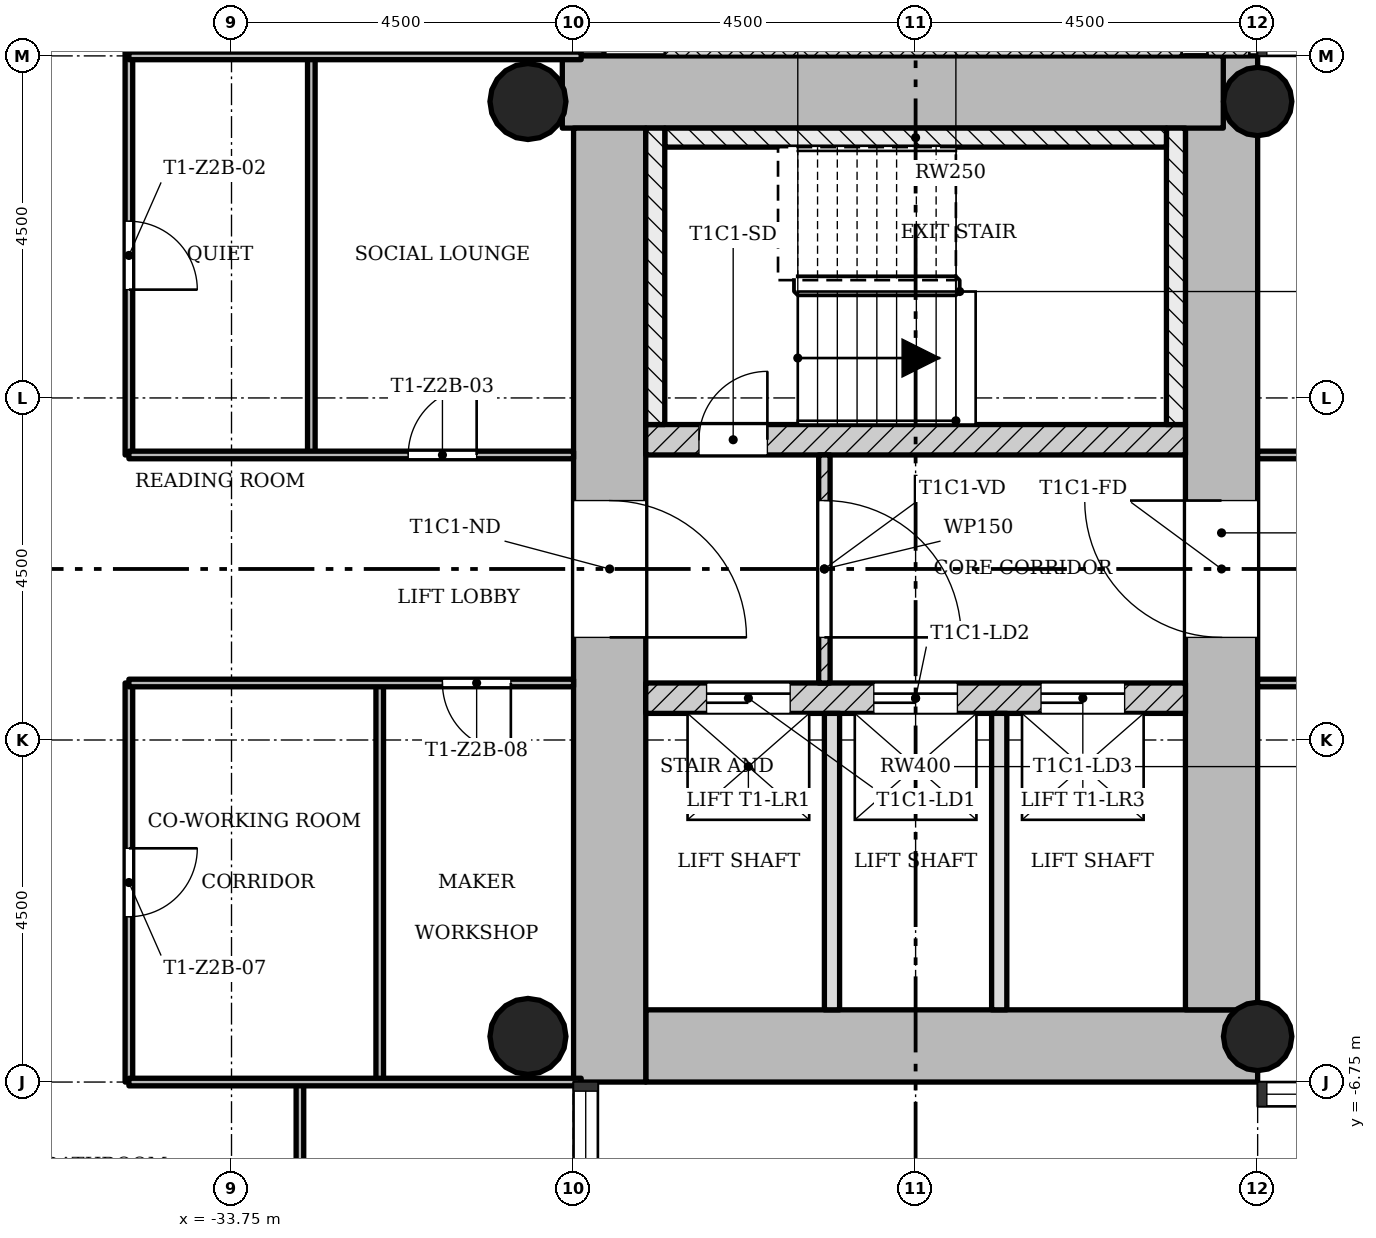
"""IFC4 building model, lengths in metres.
Left out: names, types, materials, properties, quantities, classifications, styles, units other than length and angle.
Written with IfcOpenShell. Run it as: python <this file> out.ifc"""

import sys

from ifc_helpers import new_model, si_unit, direction, frame, frame_2d, origin, origin_2d, place, context, subcontext, project, spatial, rectangle, hollow_circle, extrude, element, fill, save


model = new_model("IFC4")
c1 = context("Model", 3, precision=1e-05, world=origin(), true_north=direction((0.0, 1.0)))
c2 = subcontext(c1, "Body", "Model", "MODEL_VIEW")
j1 = project(units=[si_unit("LENGTHUNIT", "METRE"), si_unit("PLANEANGLEUNIT", "RADIAN")], contexts=[c1])
p1 = place(None, origin())
s1 = spatial("IfcSite", under=j1, at=p1, CompositionType="ELEMENT")
p2 = place(p1, origin())
s2 = spatial("IfcBuilding", under=s1, at=p2, CompositionType="ELEMENT")
p3 = place(p2, frame((0.0, 0.0, 83.4)))
s3 = spatial("IfcBuildingStorey", under=s2, at=p3, CompositionType="ELEMENT", Elevation=83.4)
p4 = place(p3, frame((-28.3, -6.275, 0.0), z_axis=(0.0, 0.0, 1.0), x_axis=(1.0, 0.0, 0.0)))
e1 = element("IfcWall", 1, at=p4, inside=s3, PredefinedType="SHEAR", context=c2, shape_type="SweptSolid", body=[
    extrude(rectangle(XDim=8.05, YDim=0.95, at=frame_2d((4.025, 0.0))), origin(), (0.0, 0.0, 1.0), 3.4),
])
p5 = place(p3, frame((-20.725, -5.8, 0.0), z_axis=(0.0, 0.0, 1.0), x_axis=(0.0, 1.0, 0.0)))
e2 = element("IfcWall", 2, at=p5, inside=s3, PredefinedType="SHEAR", context=c2, shape_type="SweptSolid", body=[
    extrude(rectangle(XDim=12.55, YDim=0.95, at=frame_2d((6.275, 0.0))), origin(), (0.0, 0.0, 1.0), 3.4),
])
p6 = place(p5, frame((4.9, 0.0, 0.0)))
e3 = element("IfcOpeningElement", 3, at=p6, cuts=e2, PredefinedType="OPENING", context=c2, shape_type="SweptSolid", body=[
    extrude(rectangle(XDim=1.8, YDim=2.1, at=frame_2d((0.9, 1.05))), frame((0.0, 0.485, 0.0), z_axis=(0.0, -1.0, 0.0), x_axis=(1.0, 0.0, 0.0)), (0.0, 0.0, 1.0), 0.97),
])
p7 = place(p3, frame((-20.702, 6.275, 0.0), z_axis=(0.0, 0.0, 1.0), x_axis=(-1.0, 0.0, 0.0)))
e4 = element("IfcWall", 4, at=p7, inside=s3, PredefinedType="SHEAR", context=c2, shape_type="SweptSolid", body=[
    extrude(rectangle(XDim=8.696, YDim=0.95, at=frame_2d((4.348, 0.0))), origin(), (0.0, 0.0, 1.0), 3.4),
])
p8 = place(p3, frame((-28.775, 5.8, 0.0), z_axis=(0.0, 0.0, 1.0), x_axis=(0.0, -1.0, 0.0)))
e5 = element("IfcWall", 5, at=p8, inside=s3, PredefinedType="SHEAR", context=c2, shape_type="SweptSolid", body=[
    extrude(rectangle(XDim=12.55, YDim=0.95, at=frame_2d((6.275, 0.0))), origin(), (0.0, 0.0, 1.0), 3.4),
])
p9 = place(p8, frame((4.9, 0.0, 0.0)))
e6 = element("IfcOpeningElement", 6, at=p9, cuts=e5, PredefinedType="OPENING", context=c2, shape_type="SweptSolid", body=[
    extrude(rectangle(XDim=1.8, YDim=2.1, at=frame_2d((0.9, 1.05))), frame((0.0, 0.485, 0.0), z_axis=(0.0, -1.0, 0.0), x_axis=(1.0, 0.0, 0.0)), (0.0, 0.0, 1.0), 0.97),
])
p10 = place(p3, frame((-28.3, -1.7, 0.0), z_axis=(0.0, 0.0, 1.0), x_axis=(1.0, 0.0, 0.0)))
e7 = element("IfcWall", 7, at=p10, inside=s3, PredefinedType="SHEAR", context=c2, shape_type="SweptSolid", body=[
    extrude(rectangle(XDim=7.1, YDim=0.4, at=frame_2d((3.55, 0.0))), origin(), (0.0, 0.0, 1.0), 3.4),
])
p11 = place(p10, frame((0.8, 0.0, 0.0)))
e8 = element("IfcOpeningElement", 8, at=p11, cuts=e7, PredefinedType="OPENING", context=c2, shape_type="SweptSolid", body=[
    extrude(rectangle(XDim=1.1, YDim=2.1, at=frame_2d((0.55, 1.05))), frame((0.0, 0.21, 0.0), z_axis=(0.0, -1.0, 0.0), x_axis=(1.0, 0.0, 0.0)), (0.0, 0.0, 1.0), 0.42),
])
p12 = place(p10, frame((3.0, 0.0, 0.0)))
e9 = element("IfcOpeningElement", 9, at=p12, cuts=e7, PredefinedType="OPENING", context=c2, shape_type="SweptSolid", body=[
    extrude(rectangle(XDim=1.1, YDim=2.1, at=frame_2d((0.55, 1.05))), frame((0.0, 0.21, 0.0), z_axis=(0.0, -1.0, 0.0), x_axis=(1.0, 0.0, 0.0)), (0.0, 0.0, 1.0), 0.42),
])
p13 = place(p10, frame((5.2, 0.0, 0.0)))
e10 = element("IfcOpeningElement", 10, at=p13, cuts=e7, PredefinedType="OPENING", context=c2, shape_type="SweptSolid", body=[
    extrude(rectangle(XDim=1.1, YDim=2.1, at=frame_2d((0.55, 1.05))), frame((0.0, 0.21, 0.0), z_axis=(0.0, -1.0, 0.0), x_axis=(1.0, 0.0, 0.0)), (0.0, 0.0, 1.0), 0.42),
])
p14 = place(p3, frame((-28.3, 1.7, 0.0), z_axis=(0.0, 0.0, 1.0), x_axis=(1.0, 0.0, 0.0)))
e11 = element("IfcWall", 11, at=p14, inside=s3, PredefinedType="SHEAR", context=c2, shape_type="SweptSolid", body=[
    extrude(rectangle(XDim=7.1, YDim=0.4, at=frame_2d((3.55, 0.0))), origin(), (0.0, 0.0, 1.0), 3.4),
])
p15 = place(p14, frame((0.7, 0.0, 0.0)))
e12 = element("IfcOpeningElement", 12, at=p15, cuts=e11, PredefinedType="OPENING", context=c2, shape_type="SweptSolid", body=[
    extrude(rectangle(XDim=0.9, YDim=2.1, at=frame_2d((0.45, 1.05))), frame((0.0, 0.21, 0.0), z_axis=(0.0, -1.0, 0.0), x_axis=(1.0, 0.0, 0.0)), (0.0, 0.0, 1.0), 0.42),
])
for number, where, z_axis, x_axis in (
    (13, (-20.25, -6.15, 0.0), (0.0, 0.0, 1.0), (1.0, 0.0, 0.0)),
    (14, (-20.25, 6.15, 0.0), (0.0, 0.0, 1.0), (1.0, 0.0, 0.0)),
):
    element("IfcColumn", number, at=place(p3, frame(where, z_axis=z_axis, x_axis=x_axis)), inside=s3, PredefinedType="COLUMN", context=c2, shape_type="SweptSolid", body=[
        extrude(hollow_circle(Radius=0.45, WallThickness=0.032, at=origin_2d()), origin(), (0.0, 0.0, 1.0), 3.4),
    ])
for number, where, z_axis, x_axis in (
    (15, (-29.85, -6.15, 0.0), (0.0, 0.0, 1.0), (1.0, 0.0, 0.0)),
    (16, (-29.85, 6.15, 0.0), (0.0, 0.0, 1.0), (1.0, 0.0, 0.0)),
):
    element("IfcColumn", number, at=place(p3, frame(where, z_axis=z_axis, x_axis=x_axis)), inside=s3, PredefinedType="COLUMN", context=c2, shape_type="SweptSolid", body=[
        extrude(hollow_circle(Radius=0.5, WallThickness=0.036, at=origin_2d()), origin(), (0.0, 0.0, 1.0), 3.4),
    ])
p16 = place(p3, frame((-29.05, 6.75, -0.02), z_axis=(0.0, 0.0, 1.0), x_axis=(0.0, 1.0, 0.0)))
e17 = element("IfcWall", 17, at=p16, inside=s3, PredefinedType="STANDARD", context=c2, shape_type="SweptSolid", body=[
    extrude(rectangle(XDim=4.5, YDim=0.4, at=frame_2d((2.25, 0.0))), origin(), (0.0, 0.0, 1.0), 3.12),
])
p17 = place(p16, frame((1.35, 0.0, 0.02)))
e18 = element("IfcOpeningElement", 18, at=p17, cuts=e17, PredefinedType="OPENING", context=c2, shape_type="SweptSolid", body=[
    extrude(rectangle(XDim=1.8, YDim=2.1, at=frame_2d((0.9, 1.05))), frame((0.0, 0.21, 0.0), z_axis=(0.0, -1.0, 0.0), x_axis=(1.0, 0.0, 0.0)), (0.0, 0.0, 1.0), 0.42),
])
p18 = place(p3, frame((-25.95, -1.5, 0.0), z_axis=(0.0, 0.0, 1.0), x_axis=(0.0, 1.0, 0.0)))
e19 = element("IfcWall", 19, at=p18, inside=s3, PredefinedType="PARTITIONING", context=c2, shape_type="SweptSolid", body=[
    extrude(rectangle(XDim=3.0, YDim=0.15, at=frame_2d((1.5, 0.0))), origin(), (0.0, 0.0, 1.0), 3.0),
])
p19 = place(p18, frame((0.6, 0.0, 0.0)))
e20 = element("IfcOpeningElement", 20, at=p19, cuts=e19, PredefinedType="OPENING", context=c2, shape_type="SweptSolid", body=[
    extrude(rectangle(XDim=1.8, YDim=2.1, at=frame_2d((0.9, 1.05))), frame((0.0, 0.085, 0.0), z_axis=(0.0, -1.0, 0.0), x_axis=(1.0, 0.0, 0.0)), (0.0, 0.0, 1.0), 0.17),
])
for number, where, z_axis, x_axis in (
    (21, (-25.85, -5.8, 0.0), (0.0, 0.0, 1.0), (0.0, 1.0, 0.0)),
    (22, (-23.65, -5.8, 0.0), (0.0, 0.0, 1.0), (0.0, 1.0, 0.0)),
):
    element("IfcWall", number, at=place(p3, frame(where, z_axis=z_axis, x_axis=x_axis)), inside=s3, PredefinedType="SOLIDWALL", context=c2, shape_type="SweptSolid", body=[
        extrude(rectangle(XDim=3.9, YDim=0.2, at=frame_2d((1.95, 0.0))), origin(), (0.0, 0.0, 1.0), 3.0),
    ])
p20 = place(p3, frame((-35.1, -6.75, 0.0), z_axis=(0.0, 0.0, 1.0), x_axis=(0.0, 1.0, 0.0)))
e23 = element("IfcWall", 23, at=p20, inside=s3, PredefinedType="PARTITIONING", context=c2, shape_type="SweptSolid", body=[
    extrude(rectangle(XDim=5.25, YDim=0.1, at=frame_2d((2.625, 0.0))), origin(), (0.0, 0.0, 1.0), 3.0),
])
p21 = place(p20, frame((2.175, 0.0, 0.0)))
e24 = element("IfcOpeningElement", 24, at=p21, cuts=e23, PredefinedType="OPENING", context=c2, shape_type="SweptSolid", body=[
    extrude(rectangle(XDim=0.9, YDim=2.1, at=frame_2d((0.45, 1.05))), frame((0.0, 0.06, 0.0), z_axis=(0.0, -1.0, 0.0), x_axis=(1.0, 0.0, 0.0)), (0.0, 0.0, 1.0), 0.12),
])
p22 = place(p3, frame((-35.1, 1.5, 0.0), z_axis=(0.0, 0.0, 1.0), x_axis=(0.0, 1.0, 0.0)))
e25 = element("IfcWall", 25, at=p22, inside=s3, PredefinedType="PARTITIONING", context=c2, shape_type="SweptSolid", body=[
    extrude(rectangle(XDim=9.75, YDim=0.1, at=frame_2d((4.875, 0.0))), origin(), (0.0, 0.0, 1.0), 3.0),
])
p23 = place(p22, frame((2.175, 0.0, 0.0)))
e26 = element("IfcOpeningElement", 26, at=p23, cuts=e25, PredefinedType="OPENING", context=c2, shape_type="SweptSolid", body=[
    extrude(rectangle(XDim=0.9, YDim=2.1, at=frame_2d((0.45, 1.05))), frame((0.0, 0.06, 0.0), z_axis=(0.0, -1.0, 0.0), x_axis=(1.0, 0.0, 0.0)), (0.0, 0.0, 1.0), 0.12),
])
p24 = place(p22, frame((7.05, 0.0, 0.0)))
e27 = element("IfcOpeningElement", 27, at=p24, cuts=e25, PredefinedType="OPENING", context=c2, shape_type="SweptSolid", body=[
    extrude(rectangle(XDim=0.9, YDim=2.1, at=frame_2d((0.45, 1.05))), frame((0.0, 0.06, 0.0), z_axis=(0.0, -1.0, 0.0), x_axis=(1.0, 0.0, 0.0)), (0.0, 0.0, 1.0), 0.12),
])
p25 = place(p3, frame((-32.85, -15.75, 0.0), z_axis=(0.0, 0.0, 1.0), x_axis=(0.0, 1.0, 0.0)))
e28 = element("IfcWall", 28, at=p25, inside=s3, PredefinedType="PARTITIONING", context=c2, shape_type="SweptSolid", body=[
    extrude(rectangle(XDim=9.0, YDim=0.1, at=frame_2d((4.5, 0.0))), origin(), (0.0, 0.0, 1.0), 3.0),
])
p26 = place(p25, frame((5.55, 0.0, 0.0)))
e29 = element("IfcOpeningElement", 29, at=p26, cuts=e28, PredefinedType="OPENING", context=c2, shape_type="SweptSolid", body=[
    extrude(rectangle(XDim=0.9, YDim=2.1, at=frame_2d((0.45, 1.05))), frame((0.0, 0.06, 0.0), z_axis=(0.0, -1.0, 0.0), x_axis=(1.0, 0.0, 0.0)), (0.0, 0.0, 1.0), 0.12),
])
for number, where, z_axis, x_axis in (
    (30, (-32.7, 1.5, 0.0), (0.0, 0.0, 1.0), (0.0, 1.0, 0.0)),
    (31, (-31.8, -6.75, 0.0), (0.0, 0.0, 1.0), (0.0, 1.0, 0.0)),
):
    element("IfcWall", number, at=place(p3, frame(where, z_axis=z_axis, x_axis=x_axis)), inside=s3, PredefinedType="PARTITIONING", context=c2, shape_type="SweptSolid", body=[
        extrude(rectangle(XDim=5.25, YDim=0.1, at=frame_2d((2.625, 0.0))), origin(), (0.0, 0.0, 1.0), 3.0),
    ])
p27 = place(p3, frame((-35.1, -6.75, 0.0), z_axis=(0.0, 0.0, 1.0), x_axis=(1.0, 0.0, 0.0)))
e32 = element("IfcWall", 32, at=p27, inside=s3, PredefinedType="PARTITIONING", context=c2, shape_type="SweptSolid", body=[
    extrude(rectangle(XDim=5.95, YDim=0.1, at=frame_2d((2.975, 0.0))), origin(), (0.0, 0.0, 1.0), 3.0),
])
p28 = place(p3, frame((-35.1, -1.5, 0.0), z_axis=(0.0, 0.0, 1.0), x_axis=(1.0, 0.0, 0.0)))
e33 = element("IfcWall", 33, at=p28, inside=s3, PredefinedType="PARTITIONING", context=c2, shape_type="SweptSolid", body=[
    extrude(rectangle(XDim=5.85, YDim=0.1, at=frame_2d((2.925, 0.0))), origin(), (0.0, 0.0, 1.0), 3.0),
])
p29 = place(p28, frame((4.125, 0.0, 0.0)))
e34 = element("IfcOpeningElement", 34, at=p29, cuts=e33, PredefinedType="OPENING", context=c2, shape_type="SweptSolid", body=[
    extrude(rectangle(XDim=0.9, YDim=2.1, at=frame_2d((0.45, 1.05))), frame((0.0, 0.06, 0.0), z_axis=(0.0, -1.0, 0.0), x_axis=(1.0, 0.0, 0.0)), (0.0, 0.0, 1.0), 0.12),
])
p30 = place(p3, frame((-20.25, -1.5, 0.0), z_axis=(0.0, 0.0, 1.0), x_axis=(1.0, 0.0, 0.0)))
e35 = element("IfcWall", 35, at=p30, inside=s3, PredefinedType="PARTITIONING", context=c2, shape_type="SweptSolid", body=[
    extrude(rectangle(XDim=4.5, YDim=0.1, at=frame_2d((2.25, 0.0))), origin(), (0.0, 0.0, 1.0), 3.0),
])
p31 = place(p30, frame((1.8, 0.0, 0.0)))
e36 = element("IfcOpeningElement", 36, at=p31, cuts=e35, PredefinedType="OPENING", context=c2, shape_type="SweptSolid", body=[
    extrude(rectangle(XDim=0.9, YDim=2.1, at=frame_2d((0.45, 1.05))), frame((0.0, 0.06, 0.0), z_axis=(0.0, -1.0, 0.0), x_axis=(1.0, 0.0, 0.0)), (0.0, 0.0, 1.0), 0.12),
])
p32 = place(p3, frame((-35.1, 1.5, 0.0), z_axis=(0.0, 0.0, 1.0), x_axis=(1.0, 0.0, 0.0)))
e37 = element("IfcWall", 37, at=p32, inside=s3, PredefinedType="PARTITIONING", context=c2, shape_type="SweptSolid", body=[
    extrude(rectangle(XDim=5.85, YDim=0.1, at=frame_2d((2.925, 0.0))), origin(), (0.0, 0.0, 1.0), 3.0),
])
p33 = place(p32, frame((3.675, 0.0, 0.0)))
e38 = element("IfcOpeningElement", 38, at=p33, cuts=e37, PredefinedType="OPENING", context=c2, shape_type="SweptSolid", body=[
    extrude(rectangle(XDim=0.9, YDim=2.1, at=frame_2d((0.45, 1.05))), frame((0.0, 0.06, 0.0), z_axis=(0.0, -1.0, 0.0), x_axis=(1.0, 0.0, 0.0)), (0.0, 0.0, 1.0), 0.12),
])
p34 = place(p3, frame((-20.25, 1.5, 0.0), z_axis=(0.0, 0.0, 1.0), x_axis=(1.0, 0.0, 0.0)))
e39 = element("IfcWall", 39, at=p34, inside=s3, PredefinedType="PARTITIONING", context=c2, shape_type="SweptSolid", body=[
    extrude(rectangle(XDim=4.5, YDim=0.1, at=frame_2d((2.25, 0.0))), origin(), (0.0, 0.0, 1.0), 3.0),
])
p35 = place(p34, frame((1.8, 0.0, 0.0)))
e40 = element("IfcOpeningElement", 40, at=p35, cuts=e39, PredefinedType="OPENING", context=c2, shape_type="SweptSolid", body=[
    extrude(rectangle(XDim=0.9, YDim=2.1, at=frame_2d((0.45, 1.05))), frame((0.0, 0.06, 0.0), z_axis=(0.0, -1.0, 0.0), x_axis=(1.0, 0.0, 0.0)), (0.0, 0.0, 1.0), 0.12),
])
p36 = place(p3, frame((-35.1, 6.75, 0.0), z_axis=(0.0, 0.0, 1.0), x_axis=(1.0, 0.0, 0.0)))
e41 = element("IfcWall", 41, at=p36, inside=s3, PredefinedType="PARTITIONING", context=c2, shape_type="SweptSolid", body=[
    extrude(rectangle(XDim=5.95, YDim=0.1, at=frame_2d((2.975, 0.0))), origin(), (0.0, 0.0, 1.0), 3.0),
])
p37 = place(p3, frame((-21.325, 1.9, 0.0), z_axis=(0.0, 0.0, 1.0), x_axis=(0.0, 1.0, 0.0)))
e42 = element("IfcWall", 42, at=p37, inside=s3, PredefinedType="SHEAR", context=c2, shape_type="SweptSolid", body=[
    extrude(rectangle(XDim=3.9, YDim=0.25, at=frame_2d((1.95, 0.0))), origin(), (0.0, 0.0, 1.0), 3.4),
])
p38 = place(p3, frame((-28.05, 5.675, 0.0), z_axis=(0.0, 0.0, 1.0), x_axis=(1.0, 0.0, 0.0)))
e43 = element("IfcWall", 43, at=p38, inside=s3, PredefinedType="SHEAR", context=c2, shape_type="SweptSolid", body=[
    extrude(rectangle(XDim=6.6, YDim=0.25, at=frame_2d((3.3, 0.0))), origin(), (0.0, 0.0, 1.0), 3.4),
])
p39 = place(p3, frame((-28.175, 1.9, 0.0), z_axis=(0.0, 0.0, 1.0), x_axis=(0.0, 1.0, 0.0)))
e44 = element("IfcWall", 44, at=p39, inside=s3, PredefinedType="SHEAR", context=c2, shape_type="SweptSolid", body=[
    extrude(rectangle(XDim=3.9, YDim=0.25, at=frame_2d((1.95, 0.0))), origin(), (0.0, 0.0, 1.0), 3.4),
])
p40 = place(p19, origin())
e45 = element("IfcDoor", 45, at=p40, inside=s3, OperationType="SINGLE_SWING_LEFT", PredefinedType="DOOR", context=c2, shape_type="SweptSolid", body=[
    extrude(rectangle(XDim=1.8, YDim=2.1, at=frame_2d((0.9, 1.05))), frame((0.0, 0.025, 0.0), z_axis=(0.0, -1.0, 0.0), x_axis=(1.0, 0.0, 0.0)), (0.0, 0.0, 1.0), 0.05),
])
fill(e20, e45)
p41 = place(p23, origin())
e46 = element("IfcDoor", 46, at=p41, inside=s3, OperationType="SINGLE_SWING_LEFT", PredefinedType="DOOR", context=c2, shape_type="SweptSolid", body=[
    extrude(rectangle(XDim=0.9, YDim=2.1, at=frame_2d((0.45, 1.05))), frame((0.0, 0.025, 0.0), z_axis=(0.0, -1.0, 0.0), x_axis=(1.0, 0.0, 0.0)), (0.0, 0.0, 1.0), 0.05),
])
fill(e26, e46)
p42 = place(p33, origin())
e47 = element("IfcDoor", 47, at=p42, inside=s3, OperationType="SINGLE_SWING_LEFT", PredefinedType="DOOR", context=c2, shape_type="SweptSolid", body=[
    extrude(rectangle(XDim=0.9, YDim=2.1, at=frame_2d((0.45, 1.05))), frame((0.0, 0.025, 0.0), z_axis=(0.0, -1.0, 0.0), x_axis=(1.0, 0.0, 0.0)), (0.0, 0.0, 1.0), 0.05),
])
fill(e38, e47)
p43 = place(p21, origin())
e48 = element("IfcDoor", 48, at=p43, inside=s3, OperationType="SINGLE_SWING_RIGHT", PredefinedType="DOOR", context=c2, shape_type="SweptSolid", body=[
    extrude(rectangle(XDim=0.9, YDim=2.1, at=frame_2d((0.45, 1.05))), frame((0.0, 0.025, 0.0), z_axis=(0.0, -1.0, 0.0), x_axis=(1.0, 0.0, 0.0)), (0.0, 0.0, 1.0), 0.05),
])
fill(e24, e48)
p44 = place(p29, origin())
e49 = element("IfcDoor", 49, at=p44, inside=s3, OperationType="SINGLE_SWING_RIGHT", PredefinedType="DOOR", context=c2, shape_type="SweptSolid", body=[
    extrude(rectangle(XDim=0.9, YDim=2.1, at=frame_2d((0.45, 1.05))), frame((0.0, 0.025, 0.0), z_axis=(0.0, -1.0, 0.0), x_axis=(1.0, 0.0, 0.0)), (0.0, 0.0, 1.0), 0.05),
])
fill(e34, e49)
p45 = place(p15, origin())
e50 = element("IfcDoor", 50, at=p45, inside=s3, OperationType="SINGLE_SWING_LEFT", PredefinedType="DOOR", context=c2, shape_type="SweptSolid", body=[
    extrude(rectangle(XDim=0.9, YDim=2.1, at=frame_2d((0.45, 1.05))), frame((0.0, 0.025, 0.0), z_axis=(0.0, -1.0, 0.0), x_axis=(1.0, 0.0, 0.0)), (0.0, 0.0, 1.0), 0.05),
])
fill(e12, e50)
p46 = place(p11, origin())
e51 = element("IfcDoor", 51, at=p46, inside=s3, OperationType="SLIDING_TO_LEFT", PredefinedType="DOOR", context=c2, shape_type="SweptSolid", body=[
    extrude(rectangle(XDim=1.1, YDim=2.1, at=frame_2d((0.55, 1.05))), frame((0.0, 0.025, 0.0), z_axis=(0.0, -1.0, 0.0), x_axis=(1.0, 0.0, 0.0)), (0.0, 0.0, 1.0), 0.05),
])
fill(e8, e51)
p47 = place(p12, origin())
e52 = element("IfcDoor", 52, at=p47, inside=s3, OperationType="SLIDING_TO_LEFT", PredefinedType="DOOR", context=c2, shape_type="SweptSolid", body=[
    extrude(rectangle(XDim=1.1, YDim=2.1, at=frame_2d((0.55, 1.05))), frame((0.0, 0.025, 0.0), z_axis=(0.0, -1.0, 0.0), x_axis=(1.0, 0.0, 0.0)), (0.0, 0.0, 1.0), 0.05),
])
fill(e9, e52)
p48 = place(p13, origin())
e53 = element("IfcDoor", 53, at=p48, inside=s3, OperationType="SLIDING_TO_LEFT", PredefinedType="DOOR", context=c2, shape_type="SweptSolid", body=[
    extrude(rectangle(XDim=1.1, YDim=2.1, at=frame_2d((0.55, 1.05))), frame((0.0, 0.025, 0.0), z_axis=(0.0, -1.0, 0.0), x_axis=(1.0, 0.0, 0.0)), (0.0, 0.0, 1.0), 0.05),
])
fill(e10, e53)
p49 = place(p9, origin())
e54 = element("IfcDoor", 54, at=p49, inside=s3, OperationType="SINGLE_SWING_LEFT", PredefinedType="DOOR", context=c2, shape_type="SweptSolid", body=[
    extrude(rectangle(XDim=1.8, YDim=2.1, at=frame_2d((0.9, 1.05))), frame((0.0, 0.025, 0.0), z_axis=(0.0, -1.0, 0.0), x_axis=(1.0, 0.0, 0.0)), (0.0, 0.0, 1.0), 0.05),
])
fill(e6, e54)
p50 = place(p6, origin())
e55 = element("IfcDoor", 55, at=p50, inside=s3, OperationType="SINGLE_SWING_LEFT", PredefinedType="DOOR", context=c2, shape_type="SweptSolid", body=[
    extrude(rectangle(XDim=1.8, YDim=2.1, at=frame_2d((0.9, 1.05))), frame((0.0, 0.025, 0.0), z_axis=(0.0, -1.0, 0.0), x_axis=(1.0, 0.0, 0.0)), (0.0, 0.0, 1.0), 0.05),
])
fill(e3, e55)
save(model, sys.argv[1])
